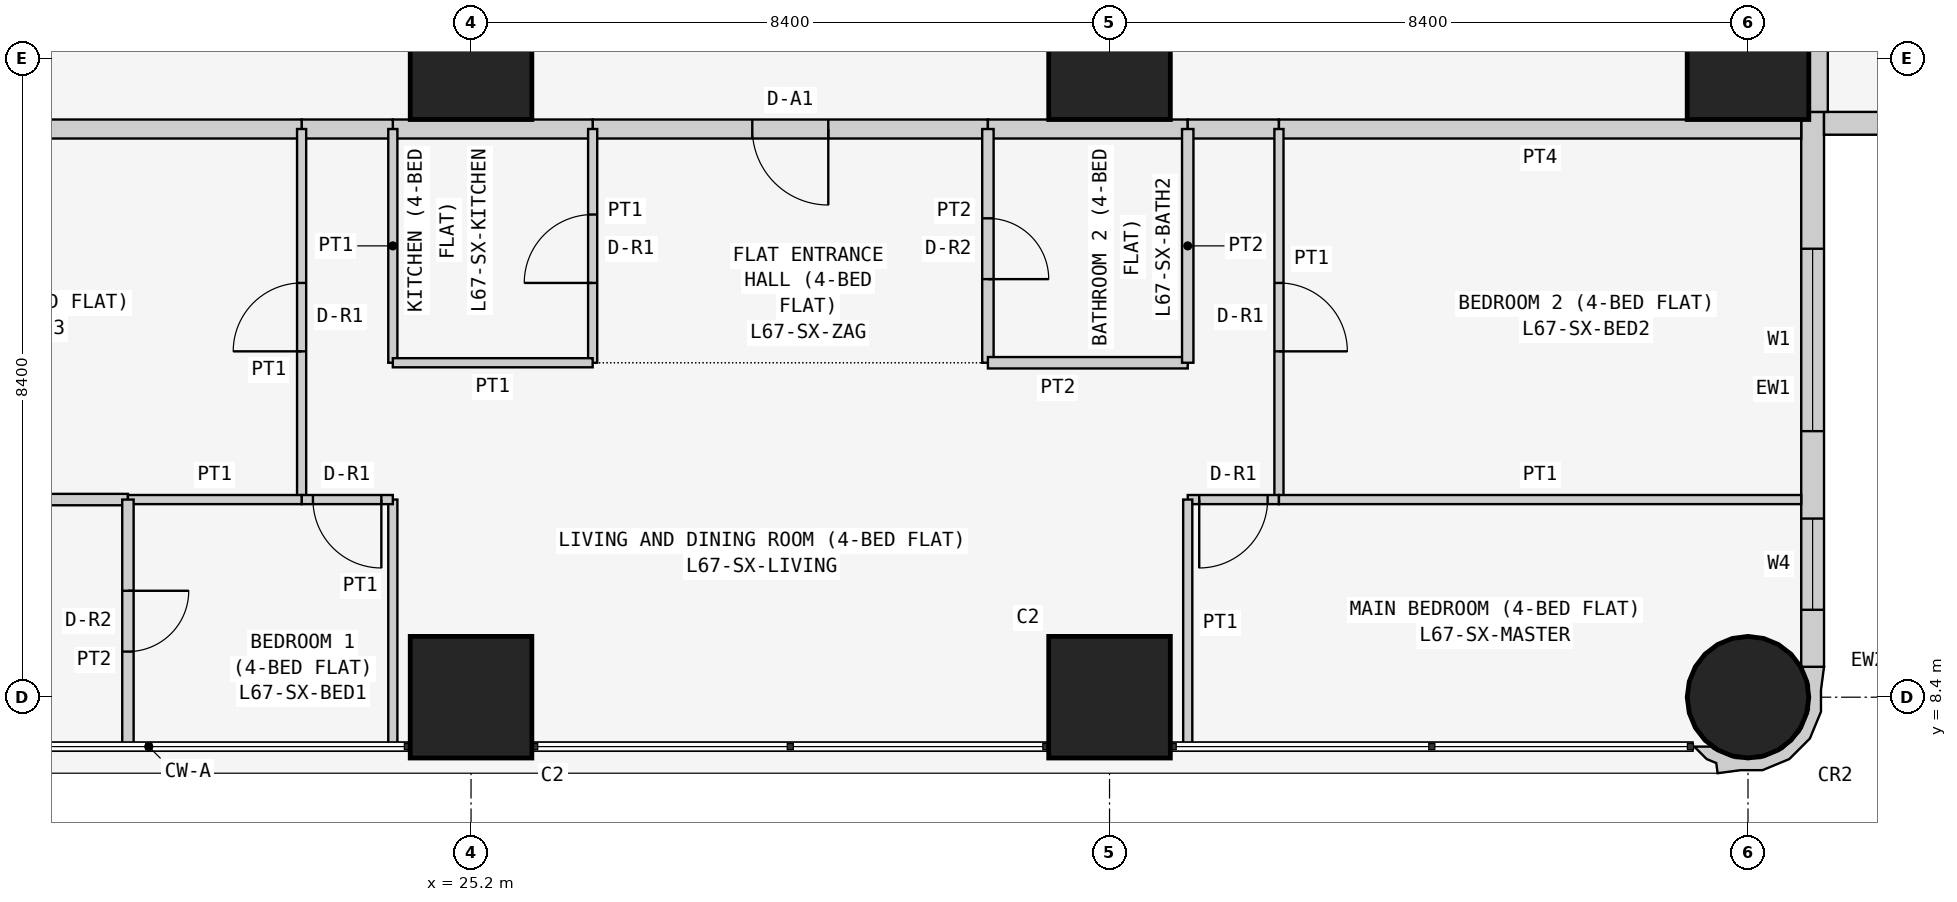
"""IFC4 building model, lengths in metres.
Left out: names, types, materials, properties, quantities, classifications, styles, units other than length and angle.
Written with IfcOpenShell. Run it as: python <this file> out.ifc"""

import sys

from ifc_helpers import new_model, si_unit, direction, frame, frame_2d, origin, origin_2d, place, context, subcontext, project, spatial, polyline, rectangle, circle, outline, extrude, element, fill, save


model = new_model("IFC4")
c1 = context("Model", 3, precision=1e-05, world=origin(), true_north=direction((0.0, 1.0)))
c2 = subcontext(c1, "Body", "Model", "MODEL_VIEW")
j1 = project(units=[si_unit("LENGTHUNIT", "METRE"), si_unit("PLANEANGLEUNIT", "RADIAN")], contexts=[c1])
p1 = place(None, origin())
s1 = spatial("IfcSite", under=j1, at=p1, CompositionType="ELEMENT")
p2 = place(p1, origin())
s2 = spatial("IfcBuilding", under=s1, at=p2, CompositionType="ELEMENT")
p3 = place(p2, frame((0.0, 0.0, 257.7)))
s3 = spatial("IfcBuildingStorey", under=s2, at=p3, CompositionType="ELEMENT", Elevation=257.7)
for number, where, z_axis, x_axis in (
    (1, (25.2, 8.4, 0.0), (0.0, 0.0, 1.0), (1.0, 0.0, 0.0)),
    (2, (25.2, 16.8, 0.0), (0.0, 0.0, 1.0), (1.0, 0.0, 0.0)),
    (3, (33.6, 8.4, 0.0), (0.0, 0.0, 1.0), (1.0, 0.0, 0.0)),
    (4, (33.6, 16.8, 0.0), (0.0, 0.0, 1.0), (1.0, 0.0, 0.0)),
):
    element("IfcColumn", number, at=place(p3, frame(where, z_axis=z_axis, x_axis=x_axis)), inside=s3, PredefinedType="COLUMN", context=c2, shape_type="SweptSolid", body=[
        extrude(rectangle(XDim=1.6, YDim=1.6, at=origin_2d()), origin(), (0.0, 0.0, 1.0), 3.6),
    ])
p4 = place(p3, frame((42.0, 8.4, 0.0), z_axis=(0.0, 0.0, 1.0), x_axis=(1.0, 0.0, 0.0)))
e5 = element("IfcColumn", 5, at=p4, inside=s3, PredefinedType="COLUMN", context=c2, shape_type="SweptSolid", body=[
    extrude(circle(Radius=0.8, at=origin_2d()), origin(), (0.0, 0.0, 1.0), 3.6),
])
p5 = place(p3, frame((42.0, 16.8, 0.0), z_axis=(0.0, 0.0, 1.0), x_axis=(1.0, 0.0, 0.0)))
e6 = element("IfcColumn", 6, at=p5, inside=s3, PredefinedType="COLUMN", context=c2, shape_type="SweptSolid", body=[
    extrude(rectangle(XDim=1.6, YDim=1.6, at=origin_2d()), origin(), (0.0, 0.0, 1.0), 3.6),
])
p6 = place(p3, frame((42.85, 8.8, 0.0), z_axis=(0.0, 0.0, 1.0), x_axis=(0.0, 1.0, 0.0)))
e7 = element("IfcWall", 7, at=p6, inside=s3, PredefinedType="SOLIDWALL", context=c2, shape_type="SweptSolid", body=[
    extrude(rectangle(XDim=7.3, YDim=0.3, at=frame_2d((3.65, 0.0))), origin(), (0.0, 0.0, 1.0), 3.45),
])
p7 = place(p6, frame((3.1, 0.0, 0.9)))
e8 = element("IfcOpeningElement", 8, at=p7, cuts=e7, PredefinedType="OPENING", context=c2, shape_type="SweptSolid", body=[
    extrude(rectangle(XDim=2.4, YDim=1.5, at=frame_2d((1.2, 0.75))), frame((0.0, 0.16, 0.0), z_axis=(0.0, -1.0, 0.0), x_axis=(1.0, 0.0, 0.0)), (0.0, 0.0, 1.0), 0.32),
])
p8 = place(p6, frame((0.75, 0.0, 0.9)))
e9 = element("IfcOpeningElement", 9, at=p8, cuts=e7, PredefinedType="OPENING", context=c2, shape_type="SweptSolid", body=[
    extrude(rectangle(XDim=1.2, YDim=1.5, at=frame_2d((0.6, 0.75))), frame((0.0, 0.16, 0.0), z_axis=(0.0, -1.0, 0.0), x_axis=(1.0, 0.0, 0.0)), (0.0, 0.0, 1.0), 0.32),
])
p9 = place(p3, frame((43.0, 15.95, 0.0), z_axis=(0.0, 0.0, 1.0), x_axis=(1.0, 0.0, 0.0)))
e10 = element("IfcWall", 10, at=p9, inside=s3, PredefinedType="SOLIDWALL", context=c2, shape_type="SweptSolid", body=[
    extrude(rectangle(XDim=7.0, YDim=0.3, at=frame_2d((3.5, 0.0))), origin(), (0.0, 0.0, 1.0), 3.45),
])
p10 = place(p9, frame((1.5, 0.0, 0.9)))
e11 = element("IfcOpeningElement", 11, at=p10, cuts=e10, PredefinedType="OPENING", context=c2, shape_type="SweptSolid", body=[
    extrude(rectangle(XDim=2.4, YDim=1.5, at=frame_2d((1.2, 0.75))), frame((0.0, 0.16, 0.0), z_axis=(0.0, -1.0, 0.0), x_axis=(1.0, 0.0, 0.0)), (0.0, 0.0, 1.0), 0.32),
])
p11 = place(p9, frame((5.05, 0.0, 0.9)))
e12 = element("IfcOpeningElement", 12, at=p11, cuts=e10, PredefinedType="OPENING", context=c2, shape_type="SweptSolid", body=[
    extrude(rectangle(XDim=1.2, YDim=1.5, at=frame_2d((0.6, 0.75))), frame((0.0, 0.16, 0.0), z_axis=(0.0, -1.0, 0.0), x_axis=(1.0, 0.0, 0.0)), (0.0, 0.0, 1.0), 0.32),
])
p12 = place(p3, frame((41.352, 7.805, 0.0), z_axis=(0.0, 0.0, 1.0), x_axis=(0.343276641956, -0.93923434088, 0.0)))
e13 = element("IfcWall", 13, at=p12, inside=s3, PredefinedType="SOLIDWALL", context=c2, shape_type="SweptSolid", body=[
    extrude(outline(polyline([(-0.369, 1.89), (-0.509, 1.621), (-0.49, 1.615), (-0.479, 1.609), (-0.211, 1.62), (0.088, 1.511), (0.323, 1.295), (0.457, 1.006), (0.47, 0.688), (0.361, 0.389), (0.145, 0.154), (0.108, 0.136), (0.031, -0.075), (0.241, 0.023), (0.333, 0.124), (0.465, 0.094), (0.532, 0.393), (0.631, 0.663), (0.614, 1.044), (0.453, 1.391), (0.172, 1.649), (-0.097, 1.748), (-0.369, 1.89)])), origin(), (0.0, 0.0, 1.0), 3.45),
])
p13 = place(p3, frame((42.925, 22.971, 0.0), z_axis=(0.0, 0.0, 1.0), x_axis=(0.0, -1.0, 0.0)))
e14 = element("IfcWall", 14, at=p13, inside=s3, PredefinedType="PARTITIONING", context=c2, shape_type="SweptSolid", body=[
    extrude(rectangle(XDim=6.871, YDim=0.25, at=frame_2d((3.436, 0.0))), origin(), (0.0, 0.0, 1.0), 3.45),
])
p14 = place(p3, frame((32.0, 15.875, 0.0), z_axis=(0.0, 0.0, 1.0), x_axis=(-1.0, 0.0, 0.0)))
e15 = element("IfcWall", 15, at=p14, inside=s3, PredefinedType="PARTITIONING", context=c2, shape_type="SweptSolid", body=[
    extrude(rectangle(XDim=5.2, YDim=0.25, at=frame_2d((2.6, 0.0))), origin(), (0.0, 0.0, 1.0), 3.45),
])
p15 = place(p14, frame((2.1, 0.0, 0.0)))
e16 = element("IfcOpeningElement", 16, at=p15, cuts=e15, PredefinedType="OPENING", context=c2, shape_type="SweptSolid", body=[
    extrude(rectangle(XDim=1.0, YDim=2.1, at=frame_2d((0.5, 1.05))), frame((0.0, 0.135, 0.0), z_axis=(0.0, -1.0, 0.0), x_axis=(1.0, 0.0, 0.0)), (0.0, 0.0, 1.0), 0.27),
])
p16 = place(p3, frame((34.629, 15.875, 0.0), z_axis=(0.0, 0.0, 1.0), x_axis=(-1.0, 0.0, 0.0)))
e17 = element("IfcWall", 17, at=p16, inside=s3, PredefinedType="PARTITIONING", context=c2, shape_type="SweptSolid", body=[
    extrude(rectangle(XDim=2.629, YDim=0.25, at=frame_2d((1.314, 0.0))), origin(), (0.0, 0.0, 1.0), 3.45),
])
p17 = place(p3, frame((26.8, 15.875, 0.0), z_axis=(0.0, 0.0, 1.0), x_axis=(-1.0, 0.0, 0.0)))
e18 = element("IfcWall", 18, at=p17, inside=s3, PredefinedType="PARTITIONING", context=c2, shape_type="SweptSolid", body=[
    extrude(rectangle(XDim=2.629, YDim=0.25, at=frame_2d((1.314, 0.0))), origin(), (0.0, 0.0, 1.0), 3.45),
])
p18 = place(p3, frame((24.171, 15.875, 0.0), z_axis=(0.0, 0.0, 1.0), x_axis=(-1.0, 0.0, 0.0)))
e19 = element("IfcWall", 19, at=p18, inside=s3, PredefinedType="PARTITIONING", context=c2, shape_type="SweptSolid", body=[
    extrude(rectangle(XDim=1.2, YDim=0.25, at=frame_2d((0.6, 0.0))), origin(), (0.0, 0.0, 1.0), 3.45),
])
p19 = place(p3, frame((35.829, 15.875, 0.0), z_axis=(0.0, 0.0, 1.0), x_axis=(-1.0, 0.0, 0.0)))
e20 = element("IfcWall", 20, at=p19, inside=s3, PredefinedType="PARTITIONING", context=c2, shape_type="SweptSolid", body=[
    extrude(rectangle(XDim=1.2, YDim=0.25, at=frame_2d((0.6, 0.0))), origin(), (0.0, 0.0, 1.0), 3.45),
])
for number, where, z_axis, x_axis in (
    (21, (42.7, 15.875, 0.0), (0.0, 0.0, 1.0), (-1.0, 0.0, 0.0)),
    (22, (22.971, 15.875, 0.0), (0.0, 0.0, 1.0), (-1.0, 0.0, 0.0)),
):
    element("IfcWall", number, at=place(p3, frame(where, z_axis=z_axis, x_axis=x_axis)), inside=s3, PredefinedType="PARTITIONING", context=c2, shape_type="SweptSolid", body=[
        extrude(rectangle(XDim=6.871, YDim=0.25, at=frame_2d((3.436, 0.0))), origin(), (0.0, 0.0, 1.0), 3.45),
    ])
p20 = place(p3, frame((32.0, 12.8, 0.0), z_axis=(0.0, 0.0, 1.0), x_axis=(0.0, 1.0, 0.0)))
e23 = element("IfcWall", 23, at=p20, inside=s3, PredefinedType="PARTITIONING", context=c2, shape_type="SweptSolid", body=[
    extrude(rectangle(XDim=3.075, YDim=0.15, at=frame_2d((1.538, 0.0))), origin(), (0.0, 0.0, 1.0), 3.45),
])
p21 = place(p20, frame((1.1, 0.0, 0.0)))
e24 = element("IfcOpeningElement", 24, at=p21, cuts=e23, PredefinedType="OPENING", context=c2, shape_type="SweptSolid", body=[
    extrude(rectangle(XDim=0.8, YDim=2.1, at=frame_2d((0.4, 1.05))), frame((0.0, 0.085, 0.0), z_axis=(0.0, -1.0, 0.0), x_axis=(1.0, 0.0, 0.0)), (0.0, 0.0, 1.0), 0.17),
])
p22 = place(p3, frame((26.8, 15.875, 0.0), z_axis=(0.0, 0.0, 1.0), x_axis=(0.0, -1.0, 0.0)))
e25 = element("IfcWall", 25, at=p22, inside=s3, PredefinedType="PARTITIONING", context=c2, shape_type="SweptSolid", body=[
    extrude(rectangle(XDim=3.075, YDim=0.12, at=frame_2d((1.538, 0.0))), origin(), (0.0, 0.0, 1.0), 3.45),
])
p23 = place(p22, frame((1.125, 0.0, 0.0)))
e26 = element("IfcOpeningElement", 26, at=p23, cuts=e25, PredefinedType="OPENING", context=c2, shape_type="SweptSolid", body=[
    extrude(rectangle(XDim=0.9, YDim=2.1, at=frame_2d((0.45, 1.05))), frame((0.0, 0.07, 0.0), z_axis=(0.0, -1.0, 0.0), x_axis=(1.0, 0.0, 0.0)), (0.0, 0.0, 1.0), 0.14),
])
p24 = place(p3, frame((32.0, 12.8, 0.0), z_axis=(0.0, 0.0, 1.0), x_axis=(1.0, 0.0, 0.0)))
e27 = element("IfcWall", 27, at=p24, inside=s3, PredefinedType="PARTITIONING", context=c2, shape_type="SweptSolid", body=[
    extrude(rectangle(XDim=2.629, YDim=0.15, at=frame_2d((1.314, 0.0))), origin(), (0.0, 0.0, 1.0), 3.45),
])
p25 = place(p3, frame((34.629, 12.8, 0.0), z_axis=(0.0, 0.0, 1.0), x_axis=(0.0, 1.0, 0.0)))
e28 = element("IfcWall", 28, at=p25, inside=s3, PredefinedType="PARTITIONING", context=c2, shape_type="SweptSolid", body=[
    extrude(rectangle(XDim=3.075, YDim=0.15, at=frame_2d((1.538, 0.0))), origin(), (0.0, 0.0, 1.0), 3.45),
])
p26 = place(p3, frame((24.171, 15.875, 0.0), z_axis=(0.0, 0.0, 1.0), x_axis=(0.0, -1.0, 0.0)))
e29 = element("IfcWall", 29, at=p26, inside=s3, PredefinedType="PARTITIONING", context=c2, shape_type="SweptSolid", body=[
    extrude(rectangle(XDim=3.075, YDim=0.12, at=frame_2d((1.538, 0.0))), origin(), (0.0, 0.0, 1.0), 3.45),
])
p27 = place(p3, frame((24.171, 12.8, 0.0), z_axis=(0.0, 0.0, 1.0), x_axis=(1.0, 0.0, 0.0)))
e30 = element("IfcWall", 30, at=p27, inside=s3, PredefinedType="PARTITIONING", context=c2, shape_type="SweptSolid", body=[
    extrude(rectangle(XDim=2.629, YDim=0.12, at=frame_2d((1.314, 0.0))), origin(), (0.0, 0.0, 1.0), 3.45),
])
p28 = place(p3, frame((35.829, 15.875, 0.0), z_axis=(0.0, 0.0, 1.0), x_axis=(0.0, -1.0, 0.0)))
e31 = element("IfcWall", 31, at=p28, inside=s3, PredefinedType="PARTITIONING", context=c2, shape_type="SweptSolid", body=[
    extrude(rectangle(XDim=4.875, YDim=0.12, at=frame_2d((2.438, 0.0))), origin(), (0.0, 0.0, 1.0), 3.45),
])
p29 = place(p28, frame((2.025, 0.0, 0.0)))
e32 = element("IfcOpeningElement", 32, at=p29, cuts=e31, PredefinedType="OPENING", context=c2, shape_type="SweptSolid", body=[
    extrude(rectangle(XDim=0.9, YDim=2.1, at=frame_2d((0.45, 1.05))), frame((0.0, 0.07, 0.0), z_axis=(0.0, -1.0, 0.0), x_axis=(1.0, 0.0, 0.0)), (0.0, 0.0, 1.0), 0.14),
])
p30 = place(p3, frame((35.829, 11.0, 0.0), z_axis=(0.0, 0.0, 1.0), x_axis=(-1.0, 0.0, 0.0)))
e33 = element("IfcWall", 33, at=p30, inside=s3, PredefinedType="PARTITIONING", context=c2, shape_type="SweptSolid", body=[
    extrude(rectangle(XDim=1.2, YDim=0.12, at=frame_2d((0.6, 0.0))), origin(), (0.0, 0.0, 1.0), 3.45),
])
p31 = place(p30, frame((0.149, 0.0, 0.0)))
e34 = element("IfcOpeningElement", 34, at=p31, cuts=e33, PredefinedType="OPENING", context=c2, shape_type="SweptSolid", body=[
    extrude(rectangle(XDim=0.9, YDim=2.1, at=frame_2d((0.45, 1.05))), frame((0.0, 0.07, 0.0), z_axis=(0.0, -1.0, 0.0), x_axis=(1.0, 0.0, 0.0)), (0.0, 0.0, 1.0), 0.14),
])
p32 = place(p3, frame((34.629, 11.0, 0.0), z_axis=(0.0, 0.0, 1.0), x_axis=(0.0, -1.0, 0.0)))
e35 = element("IfcWall", 35, at=p32, inside=s3, PredefinedType="PARTITIONING", context=c2, shape_type="SweptSolid", body=[
    extrude(rectangle(XDim=3.25, YDim=0.12, at=frame_2d((1.625, 0.0))), origin(), (0.0, 0.0, 1.0), 3.45),
])
p33 = place(p3, frame((22.971, 11.0, 0.0), z_axis=(0.0, 0.0, 1.0), x_axis=(0.0, 1.0, 0.0)))
e36 = element("IfcWall", 36, at=p33, inside=s3, PredefinedType="PARTITIONING", context=c2, shape_type="SweptSolid", body=[
    extrude(rectangle(XDim=4.875, YDim=0.12, at=frame_2d((2.438, 0.0))), origin(), (0.0, 0.0, 1.0), 3.45),
])
p34 = place(p33, frame((1.95, 0.0, 0.0)))
e37 = element("IfcOpeningElement", 37, at=p34, cuts=e36, PredefinedType="OPENING", context=c2, shape_type="SweptSolid", body=[
    extrude(rectangle(XDim=0.9, YDim=2.1, at=frame_2d((0.45, 1.05))), frame((0.0, 0.07, 0.0), z_axis=(0.0, -1.0, 0.0), x_axis=(1.0, 0.0, 0.0)), (0.0, 0.0, 1.0), 0.14),
])
p35 = place(p3, frame((24.171, 7.75, 0.0), z_axis=(0.0, 0.0, 1.0), x_axis=(0.0, 1.0, 0.0)))
e38 = element("IfcWall", 38, at=p35, inside=s3, PredefinedType="PARTITIONING", context=c2, shape_type="SweptSolid", body=[
    extrude(rectangle(XDim=3.25, YDim=0.12, at=frame_2d((1.625, 0.0))), origin(), (0.0, 0.0, 1.0), 3.45),
])
p36 = place(p3, frame((24.171, 11.0, 0.0), z_axis=(0.0, 0.0, 1.0), x_axis=(-1.0, 0.0, 0.0)))
e39 = element("IfcWall", 39, at=p36, inside=s3, PredefinedType="PARTITIONING", context=c2, shape_type="SweptSolid", body=[
    extrude(rectangle(XDim=1.2, YDim=0.12, at=frame_2d((0.6, 0.0))), origin(), (0.0, 0.0, 1.0), 3.45),
])
p37 = place(p36, frame((0.151, 0.0, 0.0)))
e40 = element("IfcOpeningElement", 40, at=p37, cuts=e39, PredefinedType="OPENING", context=c2, shape_type="SweptSolid", body=[
    extrude(rectangle(XDim=0.9, YDim=2.1, at=frame_2d((0.45, 1.05))), frame((0.0, 0.07, 0.0), z_axis=(0.0, -1.0, 0.0), x_axis=(1.0, 0.0, 0.0)), (0.0, 0.0, 1.0), 0.14),
])
p38 = place(p3, frame((35.829, 11.0, 0.0), z_axis=(0.0, 0.0, 1.0), x_axis=(1.0, 0.0, 0.0)))
e41 = element("IfcWall", 41, at=p38, inside=s3, PredefinedType="PARTITIONING", context=c2, shape_type="SweptSolid", body=[
    extrude(rectangle(XDim=6.871, YDim=0.12, at=frame_2d((3.436, 0.0))), origin(), (0.0, 0.0, 1.0), 3.45),
])
p39 = place(p3, frame((16.1, 11.0, 0.0), z_axis=(0.0, 0.0, 1.0), x_axis=(1.0, 0.0, 0.0)))
e42 = element("IfcWall", 42, at=p39, inside=s3, PredefinedType="PARTITIONING", context=c2, shape_type="SweptSolid", body=[
    extrude(rectangle(XDim=4.586, YDim=0.15, at=frame_2d((2.293, 0.0))), origin(), (0.0, 0.0, 1.0), 3.45),
])
p40 = place(p3, frame((20.686, 11.0, 0.0), z_axis=(0.0, 0.0, 1.0), x_axis=(1.0, 0.0, 0.0)))
e43 = element("IfcWall", 43, at=p40, inside=s3, PredefinedType="PARTITIONING", context=c2, shape_type="SweptSolid", body=[
    extrude(rectangle(XDim=2.285, YDim=0.12, at=frame_2d((1.143, 0.0))), origin(), (0.0, 0.0, 1.0), 3.45),
])
p41 = place(p3, frame((20.686, 7.75, 0.0), z_axis=(0.0, 0.0, 1.0), x_axis=(0.0, 1.0, 0.0)))
e44 = element("IfcWall", 44, at=p41, inside=s3, PredefinedType="PARTITIONING", context=c2, shape_type="SweptSolid", body=[
    extrude(rectangle(XDim=3.25, YDim=0.15, at=frame_2d((1.625, 0.0))), origin(), (0.0, 0.0, 1.0), 3.45),
])
p42 = place(p41, frame((1.25, 0.0, 0.0)))
e45 = element("IfcOpeningElement", 45, at=p42, cuts=e44, PredefinedType="OPENING", context=c2, shape_type="SweptSolid", body=[
    extrude(rectangle(XDim=0.8, YDim=2.1, at=frame_2d((0.4, 1.05))), frame((0.0, 0.085, 0.0), z_axis=(0.0, -1.0, 0.0), x_axis=(1.0, 0.0, 0.0)), (0.0, 0.0, 1.0), 0.17),
])
p43 = place(p7, origin())
e46 = element("IfcWindow", 46, at=p43, inside=s3, PartitioningType="SINGLE_PANEL", PredefinedType="WINDOW", context=c2, shape_type="SweptSolid", body=[
    extrude(rectangle(XDim=2.4, YDim=1.5, at=frame_2d((1.2, 0.75))), frame((0.0, 0.03, 0.0), z_axis=(0.0, -1.0, 0.0), x_axis=(1.0, 0.0, 0.0)), (0.0, 0.0, 1.0), 0.06),
])
fill(e8, e46)
p44 = place(p8, origin())
e47 = element("IfcWindow", 47, at=p44, inside=s3, PartitioningType="SINGLE_PANEL", PredefinedType="WINDOW", context=c2, shape_type="SweptSolid", body=[
    extrude(rectangle(XDim=1.2, YDim=1.5, at=frame_2d((0.6, 0.75))), frame((0.0, 0.03, 0.0), z_axis=(0.0, -1.0, 0.0), x_axis=(1.0, 0.0, 0.0)), (0.0, 0.0, 1.0), 0.06),
])
fill(e9, e47)
p45 = place(p15, origin())
e48 = element("IfcDoor", 48, at=p45, inside=s3, OperationType="SINGLE_SWING_LEFT", PredefinedType="DOOR", context=c2, shape_type="SweptSolid", body=[
    extrude(rectangle(XDim=1.0, YDim=2.1, at=frame_2d((0.5, 1.05))), frame((0.0, 0.025, 0.0), z_axis=(0.0, -1.0, 0.0), x_axis=(1.0, 0.0, 0.0)), (0.0, 0.0, 1.0), 0.05),
])
fill(e16, e48)
p46 = place(p21, frame((0.8, 0.0, 0.0), z_axis=(0.0, 0.0, 1.0), x_axis=(-1.0, 0.0, 0.0)))
e49 = element("IfcDoor", 49, at=p46, inside=s3, OperationType="SINGLE_SWING_RIGHT", PredefinedType="DOOR", context=c2, shape_type="SweptSolid", body=[
    extrude(rectangle(XDim=0.8, YDim=2.1, at=frame_2d((0.4, 1.05))), frame((0.0, 0.025, 0.0), z_axis=(0.0, -1.0, 0.0), x_axis=(1.0, 0.0, 0.0)), (0.0, 0.0, 1.0), 0.05),
])
fill(e24, e49)
p47 = place(p23, frame((0.9, 0.0, 0.0), z_axis=(0.0, 0.0, 1.0), x_axis=(-1.0, 0.0, 0.0)))
e50 = element("IfcDoor", 50, at=p47, inside=s3, OperationType="SINGLE_SWING_LEFT", PredefinedType="DOOR", context=c2, shape_type="SweptSolid", body=[
    extrude(rectangle(XDim=0.9, YDim=2.1, at=frame_2d((0.45, 1.05))), frame((0.0, 0.025, 0.0), z_axis=(0.0, -1.0, 0.0), x_axis=(1.0, 0.0, 0.0)), (0.0, 0.0, 1.0), 0.05),
])
fill(e26, e50)
p48 = place(p29, origin())
e51 = element("IfcDoor", 51, at=p48, inside=s3, OperationType="SINGLE_SWING_RIGHT", PredefinedType="DOOR", context=c2, shape_type="SweptSolid", body=[
    extrude(rectangle(XDim=0.9, YDim=2.1, at=frame_2d((0.45, 1.05))), frame((0.0, 0.025, 0.0), z_axis=(0.0, -1.0, 0.0), x_axis=(1.0, 0.0, 0.0)), (0.0, 0.0, 1.0), 0.05),
])
fill(e32, e51)
p49 = place(p31, origin())
e52 = element("IfcDoor", 52, at=p49, inside=s3, OperationType="SINGLE_SWING_RIGHT", PredefinedType="DOOR", context=c2, shape_type="SweptSolid", body=[
    extrude(rectangle(XDim=0.9, YDim=2.1, at=frame_2d((0.45, 1.05))), frame((0.0, 0.025, 0.0), z_axis=(0.0, -1.0, 0.0), x_axis=(1.0, 0.0, 0.0)), (0.0, 0.0, 1.0), 0.05),
])
fill(e34, e52)
p50 = place(p34, origin())
e53 = element("IfcDoor", 53, at=p50, inside=s3, OperationType="SINGLE_SWING_LEFT", PredefinedType="DOOR", context=c2, shape_type="SweptSolid", body=[
    extrude(rectangle(XDim=0.9, YDim=2.1, at=frame_2d((0.45, 1.05))), frame((0.0, 0.025, 0.0), z_axis=(0.0, -1.0, 0.0), x_axis=(1.0, 0.0, 0.0)), (0.0, 0.0, 1.0), 0.05),
])
fill(e37, e53)
p51 = place(p37, origin())
e54 = element("IfcDoor", 54, at=p51, inside=s3, OperationType="SINGLE_SWING_LEFT", PredefinedType="DOOR", context=c2, shape_type="SweptSolid", body=[
    extrude(rectangle(XDim=0.9, YDim=2.1, at=frame_2d((0.45, 1.05))), frame((0.0, 0.025, 0.0), z_axis=(0.0, -1.0, 0.0), x_axis=(1.0, 0.0, 0.0)), (0.0, 0.0, 1.0), 0.05),
])
fill(e40, e54)
p52 = place(p42, frame((0.8, 0.0, 0.0), z_axis=(0.0, 0.0, 1.0), x_axis=(-1.0, 0.0, 0.0)))
e55 = element("IfcDoor", 55, at=p52, inside=s3, OperationType="SINGLE_SWING_LEFT", PredefinedType="DOOR", context=c2, shape_type="SweptSolid", body=[
    extrude(rectangle(XDim=0.8, YDim=2.1, at=frame_2d((0.4, 1.05))), frame((0.0, 0.025, 0.0), z_axis=(0.0, -1.0, 0.0), x_axis=(1.0, 0.0, 0.0)), (0.0, 0.0, 1.0), 0.05),
])
fill(e45, e55)
save(model, sys.argv[1])
